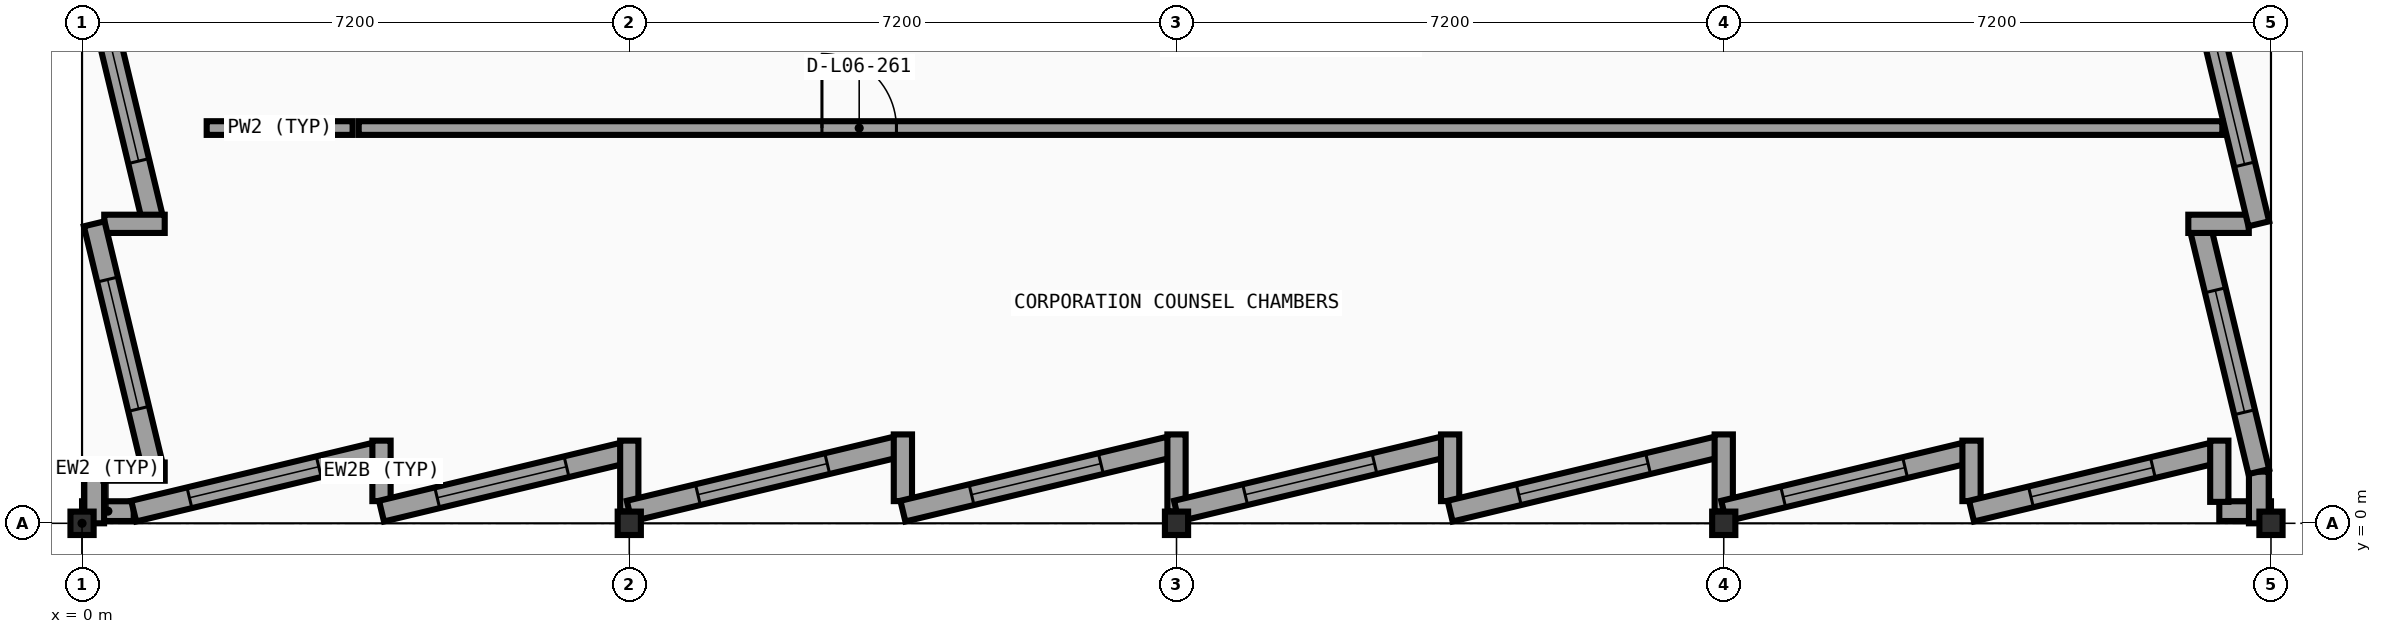
"""IFC4 building model, lengths in metres.
Left out: names, types, materials, properties, quantities, classifications, styles, units other than length and angle.
Written with IfcOpenShell. Run it as: python <this file> out.ifc"""

import sys

from ifc_helpers import new_model, si_unit, direction, frame, frame_2d, origin, origin_2d, place, context, subcontext, project, spatial, rectangle, i_section, extrude, element, fill, save


model = new_model("IFC4")
c1 = context("Model", 3, precision=1e-05, world=origin(), true_north=direction((0.0, 1.0)))
c2 = subcontext(c1, "Body", "Model", "MODEL_VIEW")
j1 = project(units=[si_unit("LENGTHUNIT", "METRE"), si_unit("PLANEANGLEUNIT", "RADIAN")], contexts=[c1])
p1 = place(None, origin())
s1 = spatial("IfcSite", under=j1, at=p1, CompositionType="ELEMENT")
p2 = place(p1, origin())
s2 = spatial("IfcBuilding", under=s1, at=p2, CompositionType="ELEMENT")
p3 = place(p2, frame((0.0, 0.0, 27.0)))
s3 = spatial("IfcBuildingStorey", under=s2, at=p3, CompositionType="ELEMENT", Elevation=27.0)
for number, where, z_axis, x_axis in (
    (1, (0.0, 0.0, 0.0), (0.0, 0.0, 1.0), (1.0, 0.0, 0.0)),
    (2, (7.2, 0.0, 0.0), (0.0, 0.0, 1.0), (1.0, 0.0, 0.0)),
    (3, (14.4, 0.0, 0.0), (0.0, 0.0, 1.0), (1.0, 0.0, 0.0)),
    (4, (21.6, 0.0, 0.0), (0.0, 0.0, 1.0), (1.0, 0.0, 0.0)),
    (5, (28.8, 0.0, 0.0), (0.0, 0.0, 1.0), (1.0, 0.0, 0.0)),
):
    element("IfcColumn", number, at=place(p3, frame(where, z_axis=z_axis, x_axis=x_axis)), inside=s3, PredefinedType="COLUMN", context=c2, shape_type="SweptSolid", body=[
        extrude(i_section(OverallWidth=0.305, OverallDepth=0.308, WebThickness=0.01, FlangeThickness=0.015, FilletRadius=0.015, at=origin_2d()), origin(), (0.0, 0.0, 1.0), 4.05),
    ])
p4 = place(p3, frame((0.0, 0.16, 0.0), z_axis=(0.0, 0.0, 1.0), x_axis=(1.0, 0.0, 0.0)))
e6 = element("IfcWall", 6, at=p4, inside=s3, PredefinedType="SOLIDWALL", context=c2, shape_type="SweptSolid", body=[
    extrude(rectangle(XDim=0.68, YDim=0.26, at=frame_2d((0.34, 0.0))), origin(), (0.0, 0.0, 1.0), 3.256),
])
p5 = place(p3, frame((0.68, 0.16, 0.0), z_axis=(0.0, 0.0, 1.0), x_axis=(0.972370292931, 0.233443812137, 0.0)))
e7 = element("IfcWall", 7, at=p5, inside=s3, PredefinedType="SOLIDWALL", context=c2, shape_type="SweptSolid", body=[
    extrude(rectangle(XDim=3.258, YDim=0.28, at=frame_2d((1.629, 0.0))), origin(), (0.0, 0.0, 1.0), 3.256),
])
p6 = place(p5, frame((0.754, 0.0, 0.8)))
e8 = element("IfcOpeningElement", 8, at=p6, cuts=e7, PredefinedType="OPENING", context=c2, shape_type="SweptSolid", body=[
    extrude(rectangle(XDim=1.75, YDim=2.05, at=frame_2d((0.875, 1.025))), frame((0.0, 0.15, 0.0), z_axis=(0.0, -1.0, 0.0), x_axis=(1.0, 0.0, 0.0)), (0.0, 0.0, 1.0), 0.3),
])
p7 = place(p3, frame((3.94, 1.088, 0.0), z_axis=(0.0, 0.0, 1.0), x_axis=(0.0, -1.0, 0.0)))
e9 = element("IfcWall", 9, at=p7, inside=s3, PredefinedType="SOLIDWALL", context=c2, shape_type="SweptSolid", body=[
    extrude(rectangle(XDim=0.796, YDim=0.24, at=frame_2d((0.398, 0.0))), origin(), (0.0, 0.0, 1.0), 3.8),
])
p8 = place(p3, frame((3.94, 0.16, 0.0), z_axis=(0.0, 0.0, 1.0), x_axis=(0.972370292931, 0.233443812137, 0.0)))
e10 = element("IfcWall", 10, at=p8, inside=s3, PredefinedType="SOLIDWALL", context=c2, shape_type="SweptSolid", body=[
    extrude(rectangle(XDim=3.258, YDim=0.28, at=frame_2d((1.629, 0.0))), origin(), (0.0, 0.0, 1.0), 3.246),
])
p9 = place(p8, frame((0.754, 0.0, 0.8)))
e11 = element("IfcOpeningElement", 11, at=p9, cuts=e10, PredefinedType="OPENING", context=c2, shape_type="SweptSolid", body=[
    extrude(rectangle(XDim=1.75, YDim=2.05, at=frame_2d((0.875, 1.025))), frame((0.0, 0.15, 0.0), z_axis=(0.0, -1.0, 0.0), x_axis=(1.0, 0.0, 0.0)), (0.0, 0.0, 1.0), 0.3),
])
p10 = place(p3, frame((7.2, 1.088, 0.0), z_axis=(0.0, 0.0, 1.0), x_axis=(0.0, -1.0, 0.0)))
e12 = element("IfcWall", 12, at=p10, inside=s3, PredefinedType="SOLIDWALL", context=c2, shape_type="SweptSolid", body=[
    extrude(rectangle(XDim=0.932, YDim=0.24, at=frame_2d((0.466, 0.0))), origin(), (0.0, 0.0, 1.0), 3.246),
])
p11 = place(p3, frame((7.2, 0.16, 0.0), z_axis=(0.0, 0.0, 1.0), x_axis=(0.972357805829, 0.233495818898, 0.0)))
e13 = element("IfcWall", 13, at=p11, inside=s3, PredefinedType="SOLIDWALL", context=c2, shape_type="SweptSolid", body=[
    extrude(rectangle(XDim=3.607, YDim=0.28, at=frame_2d((1.804, 0.0))), origin(), (0.0, 0.0, 1.0), 3.246),
])
p12 = place(p11, frame((0.929, 0.0, 0.8)))
e14 = element("IfcOpeningElement", 14, at=p12, cuts=e13, PredefinedType="OPENING", context=c2, shape_type="SweptSolid", body=[
    extrude(rectangle(XDim=1.75, YDim=2.05, at=frame_2d((0.875, 1.025))), frame((0.0, 0.15, 0.0), z_axis=(0.0, -1.0, 0.0), x_axis=(1.0, 0.0, 0.0)), (0.0, 0.0, 1.0), 0.3),
])
p13 = place(p3, frame((10.8, 1.169, 0.0), z_axis=(0.0, 0.0, 1.0), x_axis=(0.0, -1.0, 0.0)))
e15 = element("IfcWall", 15, at=p13, inside=s3, PredefinedType="SOLIDWALL", context=c2, shape_type="SweptSolid", body=[
    extrude(rectangle(XDim=0.877, YDim=0.24, at=frame_2d((0.438, 0.0))), origin(), (0.0, 0.0, 1.0), 3.8),
])
p14 = place(p3, frame((10.8, 0.16, 0.0), z_axis=(0.0, 0.0, 1.0), x_axis=(0.972357805829, 0.233495818898, 0.0)))
e16 = element("IfcWall", 16, at=p14, inside=s3, PredefinedType="SOLIDWALL", context=c2, shape_type="SweptSolid", body=[
    extrude(rectangle(XDim=3.607, YDim=0.28, at=frame_2d((1.804, 0.0))), origin(), (0.0, 0.0, 1.0), 3.246),
])
p15 = place(p14, frame((0.929, 0.0, 0.8)))
e17 = element("IfcOpeningElement", 17, at=p15, cuts=e16, PredefinedType="OPENING", context=c2, shape_type="SweptSolid", body=[
    extrude(rectangle(XDim=1.75, YDim=2.05, at=frame_2d((0.875, 1.025))), frame((0.0, 0.15, 0.0), z_axis=(0.0, -1.0, 0.0), x_axis=(1.0, 0.0, 0.0)), (0.0, 0.0, 1.0), 0.3),
])
p16 = place(p3, frame((14.4, 1.169, 0.0), z_axis=(0.0, 0.0, 1.0), x_axis=(0.0, -1.0, 0.0)))
e18 = element("IfcWall", 18, at=p16, inside=s3, PredefinedType="SOLIDWALL", context=c2, shape_type="SweptSolid", body=[
    extrude(rectangle(XDim=1.013, YDim=0.24, at=frame_2d((0.507, 0.0))), origin(), (0.0, 0.0, 1.0), 3.246),
])
p17 = place(p3, frame((14.4, 0.16, 0.0), z_axis=(0.0, 0.0, 1.0), x_axis=(0.972361495396, 0.233480453725, 0.0)))
e19 = element("IfcWall", 19, at=p17, inside=s3, PredefinedType="SOLIDWALL", context=c2, shape_type="SweptSolid", body=[
    extrude(rectangle(XDim=3.607, YDim=0.28, at=frame_2d((1.804, 0.0))), origin(), (0.0, 0.0, 1.0), 3.246),
])
p18 = place(p17, frame((0.929, 0.0, 0.8)))
e20 = element("IfcOpeningElement", 20, at=p18, cuts=e19, PredefinedType="OPENING", context=c2, shape_type="SweptSolid", body=[
    extrude(rectangle(XDim=1.75, YDim=2.05, at=frame_2d((0.875, 1.025))), frame((0.0, 0.15, 0.0), z_axis=(0.0, -1.0, 0.0), x_axis=(1.0, 0.0, 0.0)), (0.0, 0.0, 1.0), 0.3),
])
p19 = place(p3, frame((18.0, 1.169, 0.0), z_axis=(0.0, 0.0, 1.0), x_axis=(0.0, -1.0, 0.0)))
e21 = element("IfcWall", 21, at=p19, inside=s3, PredefinedType="SOLIDWALL", context=c2, shape_type="SweptSolid", body=[
    extrude(rectangle(XDim=0.877, YDim=0.24, at=frame_2d((0.438, 0.0))), origin(), (0.0, 0.0, 1.0), 3.8),
])
p20 = place(p3, frame((18.0, 0.16, 0.0), z_axis=(0.0, 0.0, 1.0), x_axis=(0.972357805829, 0.233495818898, 0.0)))
e22 = element("IfcWall", 22, at=p20, inside=s3, PredefinedType="SOLIDWALL", context=c2, shape_type="SweptSolid", body=[
    extrude(rectangle(XDim=3.607, YDim=0.28, at=frame_2d((1.804, 0.0))), origin(), (0.0, 0.0, 1.0), 3.246),
])
p21 = place(p20, frame((0.929, 0.0, 0.8)))
e23 = element("IfcOpeningElement", 23, at=p21, cuts=e22, PredefinedType="OPENING", context=c2, shape_type="SweptSolid", body=[
    extrude(rectangle(XDim=1.75, YDim=2.05, at=frame_2d((0.875, 1.025))), frame((0.0, 0.15, 0.0), z_axis=(0.0, -1.0, 0.0), x_axis=(1.0, 0.0, 0.0)), (0.0, 0.0, 1.0), 0.3),
])
p22 = place(p3, frame((21.6, 1.169, 0.0), z_axis=(0.0, 0.0, 1.0), x_axis=(0.0, -1.0, 0.0)))
e24 = element("IfcWall", 24, at=p22, inside=s3, PredefinedType="SOLIDWALL", context=c2, shape_type="SweptSolid", body=[
    extrude(rectangle(XDim=1.013, YDim=0.24, at=frame_2d((0.507, 0.0))), origin(), (0.0, 0.0, 1.0), 3.246),
])
p23 = place(p3, frame((28.12, 0.16, 0.0), z_axis=(0.0, 0.0, 1.0), x_axis=(1.0, 0.0, 0.0)))
e25 = element("IfcWall", 25, at=p23, inside=s3, PredefinedType="SOLIDWALL", context=c2, shape_type="SweptSolid", body=[
    extrude(rectangle(XDim=0.68, YDim=0.26, at=frame_2d((0.34, 0.0))), origin(), (0.0, 0.0, 1.0), 3.256),
])
p24 = place(p3, frame((21.6, 0.16, 0.0), z_axis=(0.0, 0.0, 1.0), x_axis=(0.972366208453, 0.233460824675, 0.0)))
e26 = element("IfcWall", 26, at=p24, inside=s3, PredefinedType="SOLIDWALL", context=c2, shape_type="SweptSolid", body=[
    extrude(rectangle(XDim=3.258, YDim=0.28, at=frame_2d((1.629, 0.0))), origin(), (0.0, 0.0, 1.0), 3.246),
])
p25 = place(p24, frame((0.804, 0.0, 0.8)))
e27 = element("IfcOpeningElement", 27, at=p25, cuts=e26, PredefinedType="OPENING", context=c2, shape_type="SweptSolid", body=[
    extrude(rectangle(XDim=1.65, YDim=1.9, at=frame_2d((0.825, 0.95))), frame((0.0, 0.15, 0.0), z_axis=(0.0, -1.0, 0.0), x_axis=(1.0, 0.0, 0.0)), (0.0, 0.0, 1.0), 0.3),
])
p26 = place(p3, frame((24.86, 1.088, 0.0), z_axis=(0.0, 0.0, 1.0), x_axis=(0.0, -1.0, 0.0)))
e28 = element("IfcWall", 28, at=p26, inside=s3, PredefinedType="SOLIDWALL", context=c2, shape_type="SweptSolid", body=[
    extrude(rectangle(XDim=0.796, YDim=0.24, at=frame_2d((0.398, 0.0))), origin(), (0.0, 0.0, 1.0), 3.8),
])
p27 = place(p3, frame((24.86, 0.16, 0.0), z_axis=(0.0, 0.0, 1.0), x_axis=(0.972366208453, 0.233460824675, 0.0)))
e29 = element("IfcWall", 29, at=p27, inside=s3, PredefinedType="SOLIDWALL", context=c2, shape_type="SweptSolid", body=[
    extrude(rectangle(XDim=3.258, YDim=0.28, at=frame_2d((1.629, 0.0))), origin(), (0.0, 0.0, 1.0), 3.256),
])
p28 = place(p27, frame((0.804, 0.0, 0.8)))
e30 = element("IfcOpeningElement", 30, at=p28, cuts=e29, PredefinedType="OPENING", context=c2, shape_type="SweptSolid", body=[
    extrude(rectangle(XDim=1.65, YDim=1.9, at=frame_2d((0.825, 0.95))), frame((0.0, 0.15, 0.0), z_axis=(0.0, -1.0, 0.0), x_axis=(1.0, 0.0, 0.0)), (0.0, 0.0, 1.0), 0.3),
])
p29 = place(p3, frame((28.12, 1.088, 0.0), z_axis=(0.0, 0.0, 1.0), x_axis=(0.0, -1.0, 0.0)))
e31 = element("IfcWall", 31, at=p29, inside=s3, PredefinedType="SOLIDWALL", context=c2, shape_type="SweptSolid", body=[
    extrude(rectangle(XDim=0.806, YDim=0.24, at=frame_2d((0.403, 0.0))), origin(), (0.0, 0.0, 1.0), 3.8),
])
p30 = place(p3, frame((28.64, 0.0, 0.0), z_axis=(0.0, 0.0, 1.0), x_axis=(0.0, 1.0, 0.0)))
e32 = element("IfcWall", 32, at=p30, inside=s3, PredefinedType="SOLIDWALL", context=c2, shape_type="SweptSolid", body=[
    extrude(rectangle(XDim=0.68, YDim=0.26, at=frame_2d((0.34, 0.0))), origin(), (0.0, 0.0, 1.0), 3.256),
])
p31 = place(p3, frame((28.64, 0.68, 0.0), z_axis=(0.0, 0.0, 1.0), x_axis=(-0.233443812137, 0.972370292931, 0.0)))
e33 = element("IfcWall", 33, at=p31, inside=s3, PredefinedType="SOLIDWALL", context=c2, shape_type="SweptSolid", body=[
    extrude(rectangle(XDim=3.258, YDim=0.28, at=frame_2d((1.629, 0.0))), origin(), (0.0, 0.0, 1.0), 3.256),
])
p32 = place(p31, frame((0.804, 0.0, 0.8)))
e34 = element("IfcOpeningElement", 34, at=p32, cuts=e33, PredefinedType="OPENING", context=c2, shape_type="SweptSolid", body=[
    extrude(rectangle(XDim=1.65, YDim=1.9, at=frame_2d((0.825, 0.95))), frame((0.0, 0.15, 0.0), z_axis=(0.0, -1.0, 0.0), x_axis=(1.0, 0.0, 0.0)), (0.0, 0.0, 1.0), 0.3),
])
p33 = place(p3, frame((27.712, 3.94, 0.0), z_axis=(0.0, 0.0, 1.0), x_axis=(1.0, 0.0, 0.0)))
e35 = element("IfcWall", 35, at=p33, inside=s3, PredefinedType="SOLIDWALL", context=c2, shape_type="SweptSolid", body=[
    extrude(rectangle(XDim=0.796, YDim=0.24, at=frame_2d((0.398, 0.0))), origin(), (0.0, 0.0, 1.0), 3.8),
])
p34 = place(p3, frame((28.64, 3.94, 0.0), z_axis=(0.0, 0.0, 1.0), x_axis=(-0.233443812137, 0.972370292931, 0.0)))
e36 = element("IfcWall", 36, at=p34, inside=s3, PredefinedType="SOLIDWALL", context=c2, shape_type="SweptSolid", body=[
    extrude(rectangle(XDim=3.258, YDim=0.28, at=frame_2d((1.629, 0.0))), origin(), (0.0, 0.0, 1.0), 3.246),
])
p35 = place(p34, frame((0.804, 0.0, 0.8)))
e37 = element("IfcOpeningElement", 37, at=p35, cuts=e36, PredefinedType="OPENING", context=c2, shape_type="SweptSolid", body=[
    extrude(rectangle(XDim=1.65, YDim=1.9, at=frame_2d((0.825, 0.95))), frame((0.0, 0.15, 0.0), z_axis=(0.0, -1.0, 0.0), x_axis=(1.0, 0.0, 0.0)), (0.0, 0.0, 1.0), 0.3),
])
p36 = place(p3, frame((0.16, 0.68, 0.0), z_axis=(0.0, 0.0, 1.0), x_axis=(0.0, -1.0, 0.0)))
e38 = element("IfcWall", 38, at=p36, inside=s3, PredefinedType="SOLIDWALL", context=c2, shape_type="SweptSolid", body=[
    extrude(rectangle(XDim=0.68, YDim=0.26, at=frame_2d((0.34, 0.0))), origin(), (0.0, 0.0, 1.0), 3.256),
])
p37 = place(p3, frame((0.16, 7.2, 0.0), z_axis=(0.0, 0.0, 1.0), x_axis=(0.233460824675, -0.972366208453, 0.0)))
e39 = element("IfcWall", 39, at=p37, inside=s3, PredefinedType="SOLIDWALL", context=c2, shape_type="SweptSolid", body=[
    extrude(rectangle(XDim=3.258, YDim=0.28, at=frame_2d((1.629, 0.0))), origin(), (0.0, 0.0, 1.0), 3.246),
])
p38 = place(p37, frame((0.754, 0.0, 0.8)))
e40 = element("IfcOpeningElement", 40, at=p38, cuts=e39, PredefinedType="OPENING", context=c2, shape_type="SweptSolid", body=[
    extrude(rectangle(XDim=1.75, YDim=2.05, at=frame_2d((0.875, 1.025))), frame((0.0, 0.15, 0.0), z_axis=(0.0, -1.0, 0.0), x_axis=(1.0, 0.0, 0.0)), (0.0, 0.0, 1.0), 0.3),
])
p39 = place(p3, frame((1.088, 3.94, 0.0), z_axis=(0.0, 0.0, 1.0), x_axis=(-1.0, 0.0, 0.0)))
e41 = element("IfcWall", 41, at=p39, inside=s3, PredefinedType="SOLIDWALL", context=c2, shape_type="SweptSolid", body=[
    extrude(rectangle(XDim=0.796, YDim=0.24, at=frame_2d((0.398, 0.0))), origin(), (0.0, 0.0, 1.0), 3.8),
])
p40 = place(p3, frame((0.16, 3.94, 0.0), z_axis=(0.0, 0.0, 1.0), x_axis=(0.233460824675, -0.972366208453, 0.0)))
e42 = element("IfcWall", 42, at=p40, inside=s3, PredefinedType="SOLIDWALL", context=c2, shape_type="SweptSolid", body=[
    extrude(rectangle(XDim=3.258, YDim=0.28, at=frame_2d((1.629, 0.0))), origin(), (0.0, 0.0, 1.0), 3.256),
])
p41 = place(p40, frame((0.754, 0.0, 0.8)))
e43 = element("IfcOpeningElement", 43, at=p41, cuts=e42, PredefinedType="OPENING", context=c2, shape_type="SweptSolid", body=[
    extrude(rectangle(XDim=1.75, YDim=2.05, at=frame_2d((0.875, 1.025))), frame((0.0, 0.15, 0.0), z_axis=(0.0, -1.0, 0.0), x_axis=(1.0, 0.0, 0.0)), (0.0, 0.0, 1.0), 0.3),
])
p42 = place(p3, frame((1.088, 0.68, 0.0), z_axis=(0.0, 0.0, 1.0), x_axis=(-1.0, 0.0, 0.0)))
e44 = element("IfcWall", 44, at=p42, inside=s3, PredefinedType="SOLIDWALL", context=c2, shape_type="SweptSolid", body=[
    extrude(rectangle(XDim=0.806, YDim=0.24, at=frame_2d((0.403, 0.0))), origin(), (0.0, 0.0, 1.0), 3.8),
])
p43 = place(p3, frame((1.64, 5.2, 0.0), z_axis=(0.0, 0.0, 1.0), x_axis=(1.0, 0.0, 0.0)))
e45 = element("IfcWall", 45, at=p43, inside=s3, PredefinedType="PARTITIONING", context=c2, shape_type="SweptSolid", body=[
    extrude(rectangle(XDim=1.92, YDim=0.18, at=frame_2d((0.96, 0.0))), origin(), (0.0, 0.0, 1.0), 3.8),
])
p44 = place(p3, frame((3.64, 5.2, 0.0), z_axis=(0.0, 0.0, 1.0), x_axis=(1.0, 0.0, 0.0)))
e46 = element("IfcWall", 46, at=p44, inside=s3, PredefinedType="PARTITIONING", context=c2, shape_type="SweptSolid", body=[
    extrude(rectangle(XDim=24.52, YDim=0.18, at=frame_2d((12.26, 0.0))), origin(), (0.0, 0.0, 1.0), 3.246),
])
p45 = place(p44, frame((6.095, 0.0, 0.0)))
e47 = element("IfcOpeningElement", 47, at=p45, cuts=e46, PredefinedType="OPENING", context=c2, shape_type="SweptSolid", body=[
    extrude(rectangle(XDim=0.98, YDim=2.1, at=frame_2d((0.49, 1.05))), frame((0.0, 0.1, 0.0), z_axis=(0.0, -1.0, 0.0), x_axis=(1.0, 0.0, 0.0)), (0.0, 0.0, 1.0), 0.2),
])
p46 = place(p6, origin())
e48 = element("IfcWindow", 48, at=p46, inside=s3, PartitioningType="SINGLE_PANEL", PredefinedType="WINDOW", context=c2, shape_type="SweptSolid", body=[
    extrude(rectangle(XDim=1.75, YDim=2.05, at=frame_2d((0.875, 1.025))), frame((0.0, 0.03, 0.0), z_axis=(0.0, -1.0, 0.0), x_axis=(1.0, 0.0, 0.0)), (0.0, 0.0, 1.0), 0.06),
])
fill(e8, e48)
p47 = place(p9, origin())
e49 = element("IfcWindow", 49, at=p47, inside=s3, PartitioningType="SINGLE_PANEL", PredefinedType="WINDOW", context=c2, shape_type="SweptSolid", body=[
    extrude(rectangle(XDim=1.75, YDim=2.05, at=frame_2d((0.875, 1.025))), frame((0.0, 0.03, 0.0), z_axis=(0.0, -1.0, 0.0), x_axis=(1.0, 0.0, 0.0)), (0.0, 0.0, 1.0), 0.06),
])
fill(e11, e49)
p48 = place(p12, origin())
e50 = element("IfcWindow", 50, at=p48, inside=s3, PartitioningType="SINGLE_PANEL", PredefinedType="WINDOW", context=c2, shape_type="SweptSolid", body=[
    extrude(rectangle(XDim=1.75, YDim=2.05, at=frame_2d((0.875, 1.025))), frame((0.0, 0.03, 0.0), z_axis=(0.0, -1.0, 0.0), x_axis=(1.0, 0.0, 0.0)), (0.0, 0.0, 1.0), 0.06),
])
fill(e14, e50)
p49 = place(p15, origin())
e51 = element("IfcWindow", 51, at=p49, inside=s3, PartitioningType="SINGLE_PANEL", PredefinedType="WINDOW", context=c2, shape_type="SweptSolid", body=[
    extrude(rectangle(XDim=1.75, YDim=2.05, at=frame_2d((0.875, 1.025))), frame((0.0, 0.03, 0.0), z_axis=(0.0, -1.0, 0.0), x_axis=(1.0, 0.0, 0.0)), (0.0, 0.0, 1.0), 0.06),
])
fill(e17, e51)
p50 = place(p18, origin())
e52 = element("IfcWindow", 52, at=p50, inside=s3, PartitioningType="SINGLE_PANEL", PredefinedType="WINDOW", context=c2, shape_type="SweptSolid", body=[
    extrude(rectangle(XDim=1.75, YDim=2.05, at=frame_2d((0.875, 1.025))), frame((0.0, 0.03, 0.0), z_axis=(0.0, -1.0, 0.0), x_axis=(1.0, 0.0, 0.0)), (0.0, 0.0, 1.0), 0.06),
])
fill(e20, e52)
p51 = place(p21, origin())
e53 = element("IfcWindow", 53, at=p51, inside=s3, PartitioningType="SINGLE_PANEL", PredefinedType="WINDOW", context=c2, shape_type="SweptSolid", body=[
    extrude(rectangle(XDim=1.75, YDim=2.05, at=frame_2d((0.875, 1.025))), frame((0.0, 0.03, 0.0), z_axis=(0.0, -1.0, 0.0), x_axis=(1.0, 0.0, 0.0)), (0.0, 0.0, 1.0), 0.06),
])
fill(e23, e53)
p52 = place(p25, origin())
e54 = element("IfcWindow", 54, at=p52, inside=s3, PartitioningType="SINGLE_PANEL", PredefinedType="WINDOW", context=c2, shape_type="SweptSolid", body=[
    extrude(rectangle(XDim=1.65, YDim=1.9, at=frame_2d((0.825, 0.95))), frame((0.0, 0.03, 0.0), z_axis=(0.0, -1.0, 0.0), x_axis=(1.0, 0.0, 0.0)), (0.0, 0.0, 1.0), 0.06),
])
fill(e27, e54)
p53 = place(p28, origin())
e55 = element("IfcWindow", 55, at=p53, inside=s3, PartitioningType="SINGLE_PANEL", PredefinedType="WINDOW", context=c2, shape_type="SweptSolid", body=[
    extrude(rectangle(XDim=1.65, YDim=1.9, at=frame_2d((0.825, 0.95))), frame((0.0, 0.03, 0.0), z_axis=(0.0, -1.0, 0.0), x_axis=(1.0, 0.0, 0.0)), (0.0, 0.0, 1.0), 0.06),
])
fill(e30, e55)
p54 = place(p32, origin())
e56 = element("IfcWindow", 56, at=p54, inside=s3, PartitioningType="SINGLE_PANEL", PredefinedType="WINDOW", context=c2, shape_type="SweptSolid", body=[
    extrude(rectangle(XDim=1.65, YDim=1.9, at=frame_2d((0.825, 0.95))), frame((0.0, 0.03, 0.0), z_axis=(0.0, -1.0, 0.0), x_axis=(1.0, 0.0, 0.0)), (0.0, 0.0, 1.0), 0.06),
])
fill(e34, e56)
p55 = place(p35, origin())
e57 = element("IfcWindow", 57, at=p55, inside=s3, PartitioningType="SINGLE_PANEL", PredefinedType="WINDOW", context=c2, shape_type="SweptSolid", body=[
    extrude(rectangle(XDim=1.65, YDim=1.9, at=frame_2d((0.825, 0.95))), frame((0.0, 0.03, 0.0), z_axis=(0.0, -1.0, 0.0), x_axis=(1.0, 0.0, 0.0)), (0.0, 0.0, 1.0), 0.06),
])
fill(e37, e57)
p56 = place(p38, origin())
e58 = element("IfcWindow", 58, at=p56, inside=s3, PartitioningType="SINGLE_PANEL", PredefinedType="WINDOW", context=c2, shape_type="SweptSolid", body=[
    extrude(rectangle(XDim=1.75, YDim=2.05, at=frame_2d((0.875, 1.025))), frame((0.0, 0.03, 0.0), z_axis=(0.0, -1.0, 0.0), x_axis=(1.0, 0.0, 0.0)), (0.0, 0.0, 1.0), 0.06),
])
fill(e40, e58)
p57 = place(p41, origin())
e59 = element("IfcWindow", 59, at=p57, inside=s3, PartitioningType="SINGLE_PANEL", PredefinedType="WINDOW", context=c2, shape_type="SweptSolid", body=[
    extrude(rectangle(XDim=1.75, YDim=2.05, at=frame_2d((0.875, 1.025))), frame((0.0, 0.03, 0.0), z_axis=(0.0, -1.0, 0.0), x_axis=(1.0, 0.0, 0.0)), (0.0, 0.0, 1.0), 0.06),
])
fill(e43, e59)
p58 = place(p45, origin())
e60 = element("IfcDoor", 60, at=p58, inside=s3, OperationType="SINGLE_SWING_LEFT", PredefinedType="DOOR", context=c2, shape_type="SweptSolid", body=[
    extrude(rectangle(XDim=0.98, YDim=2.1, at=frame_2d((0.49, 1.05))), frame((0.0, 0.025, 0.0), z_axis=(0.0, -1.0, 0.0), x_axis=(1.0, 0.0, 0.0)), (0.0, 0.0, 1.0), 0.05),
])
fill(e47, e60)
save(model, sys.argv[1])
